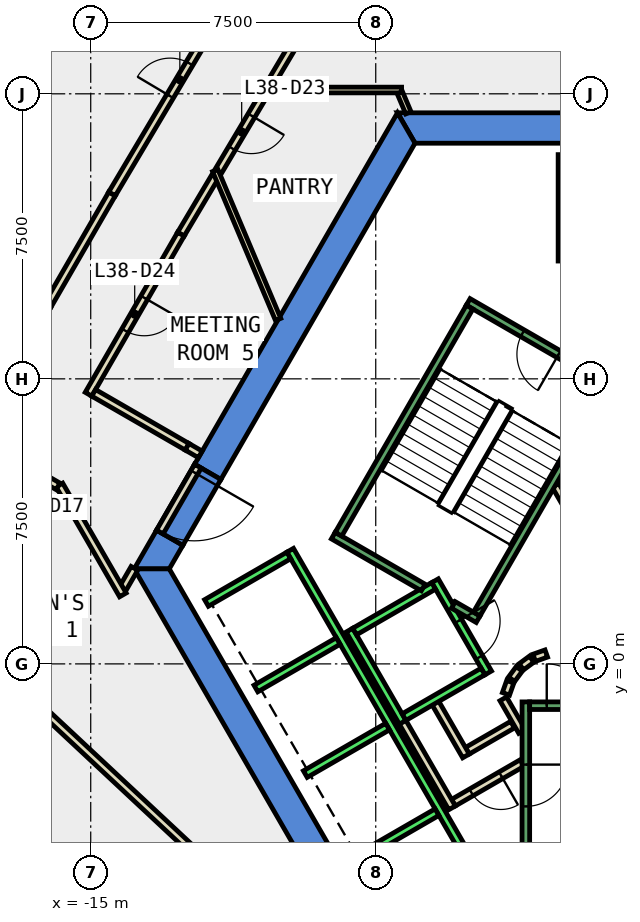
"""IFC4 building model, lengths in metres.
Left out: names, types, materials, properties, quantities, classifications, styles, units other than length and angle.
Written with IfcOpenShell. Run it as: python <this file> out.ifc"""

import sys

from ifc_helpers import new_model, si_unit, direction, frame, frame_2d, origin, place, context, subcontext, project, spatial, polyline, rectangle, outline, extrude, element, fill, save


model = new_model("IFC4")
c1 = context("Model", 3, precision=1e-05, world=origin(), true_north=direction((0.0, 1.0)))
c2 = subcontext(c1, "Body", "Model", "MODEL_VIEW")
j1 = project(units=[si_unit("LENGTHUNIT", "METRE"), si_unit("PLANEANGLEUNIT", "RADIAN")], contexts=[c1])
p1 = place(None, origin())
s1 = spatial("IfcSite", under=j1, at=p1, CompositionType="ELEMENT")
p2 = place(p1, origin())
s2 = spatial("IfcBuilding", under=s1, at=p2, CompositionType="ELEMENT")
p3 = place(p2, frame((0.0, 0.0, 171.8)))
s3 = spatial("IfcBuildingStorey", under=s2, at=p3, CompositionType="ELEMENT", Elevation=171.8)
p4 = place(p3, frame((0.0, 0.0, -0.4)))
e1 = element("IfcWall", 1, at=p4, inside=s3, PredefinedType="SHEAR", context=c2, shape_type="SweptSolid", body=[
    extrude(outline(polyline([(6.928, 14.5), (-6.928, 14.5), (-6.466, 13.7), (6.466, 13.7), (6.928, 14.5)])), origin(), (0.0, 0.0, 1.0), 4.2),
])
p5 = place(p3, frame((0.0, 0.0, -0.4)))
e2 = element("IfcWall", 2, at=p5, inside=s3, PredefinedType="SHEAR", context=c2, shape_type="SweptSolid", body=[
    extrude(outline(polyline([(-12.267, 5.252), (-11.575, 4.852), (-6.466, 13.7), (-6.928, 14.5), (-12.267, 5.252)])), origin(), (0.0, 0.0, 1.0), 4.2),
])
p6 = place(p3, frame((0.0, 0.0, -0.4)))
e3 = element("IfcWall", 3, at=p6, inside=s3, PredefinedType="SHEAR", context=c2, shape_type="SweptSolid", body=[
    extrude(outline(polyline([(-12.575, 3.12), (-13.267, 3.52), (-13.856, 2.5), (-12.933, 2.5), (-12.575, 3.12)])), origin(), (0.0, 0.0, 1.0), 4.2),
])
p7 = place(p3, frame((0.0, 0.0, 3.6)))
e4 = element("IfcWall", 4, at=p7, inside=s3, PredefinedType="SHEAR", context=c2, shape_type="SweptSolid", body=[
    extrude(outline(polyline([(-13.267, 3.52), (-12.575, 3.12), (-11.575, 4.852), (-12.267, 5.252), (-13.267, 3.52)])), origin(), (0.0, 0.0, 1.0), 0.2),
])
p8 = place(p3, frame((0.0, 0.0, -0.4)))
e5 = element("IfcWall", 5, at=p8, inside=s3, PredefinedType="SHEAR", context=c2, shape_type="SweptSolid", body=[
    extrude(outline(polyline([(-13.856, 2.5), (-6.928, -9.5), (-6.466, -8.7), (-12.933, 2.5), (-13.856, 2.5)])), origin(), (0.0, 0.0, 1.0), 4.2),
])
p9 = place(p3, frame((-10.41, 15.036, 0.0), z_axis=(0.0, 0.0, 1.0), x_axis=(-0.510900085603, -0.859640100583, 0.0)))
e6 = element("IfcWall", 6, at=p9, inside=s3, PredefinedType="PARTITIONING", context=c2, shape_type="SweptSolid", body=[
    extrude(rectangle(XDim=2.419, YDim=0.2, at=frame_2d((1.21, 0.0))), origin(), (0.0, 0.0, 1.0), 3.8),
])
p10 = place(p9, frame((0.709, 0.0, 0.0)))
e7 = element("IfcOpeningElement", 7, at=p10, cuts=e6, PredefinedType="OPENING", context=c2, shape_type="SweptSolid", body=[
    extrude(rectangle(XDim=1.0, YDim=2.1, at=frame_2d((0.5, 1.05))), frame((0.0, 0.11, 0.0), z_axis=(0.0, -1.0, 0.0), x_axis=(1.0, 0.0, 0.0)), (0.0, 0.0, 1.0), 0.22),
])
p11 = place(p3, frame((-11.723, 12.827, 0.0), z_axis=(0.0, 0.0, 1.0), x_axis=(-0.511182890129, -0.859471961637, 0.0)))
e8 = element("IfcWall", 8, at=p11, inside=s3, PredefinedType="PARTITIONING", context=c2, shape_type="SweptSolid", body=[
    extrude(rectangle(XDim=1.769, YDim=0.2, at=frame_2d((0.884, 0.0))), origin(), (0.0, 0.0, 1.0), 3.8),
])
p12 = place(p3, frame((-12.627, 11.307, 0.0), z_axis=(0.0, 0.0, 1.0), x_axis=(-0.499907870494, -0.866078588246, 0.0)))
e9 = element("IfcWall", 9, at=p12, inside=s3, PredefinedType="PARTITIONING", context=c2, shape_type="SweptSolid", body=[
    extrude(rectangle(XDim=4.863, YDim=0.2, at=frame_2d((2.432, 0.0))), origin(), (0.0, 0.0, 1.0), 3.8),
])
p13 = place(p12, frame((1.932, 0.0, 0.0)))
e10 = element("IfcOpeningElement", 10, at=p13, cuts=e9, PredefinedType="OPENING", context=c2, shape_type="SweptSolid", body=[
    extrude(rectangle(XDim=1.0, YDim=2.1, at=frame_2d((0.5, 1.05))), frame((0.0, 0.11, 0.0), z_axis=(0.0, -1.0, 0.0), x_axis=(1.0, 0.0, 0.0)), (0.0, 0.0, 1.0), 0.22),
])
p14 = place(p3, frame((-14.922, 7.131, 0.0), z_axis=(0.0, 0.0, 1.0), x_axis=(0.866124025492, -0.499829143273, 0.0)))
e11 = element("IfcWall", 11, at=p14, inside=s3, PredefinedType="PARTITIONING", context=c2, shape_type="SweptSolid", body=[
    extrude(rectangle(XDim=2.839, YDim=0.2, at=frame_2d((1.42, 0.0))), origin(), (0.0, 0.0, 1.0), 3.8),
])
p15 = place(p3, frame((-9.073, 17.285, 0.0), z_axis=(0.0, 0.0, 1.0), x_axis=(-0.51105761127, -0.859546460619, 0.0)))
e12 = element("IfcWall", 12, at=p15, inside=s3, PredefinedType="PARTITIONING", context=c2, shape_type="SweptSolid", body=[
    extrude(rectangle(XDim=2.467, YDim=0.2, at=frame_2d((1.234, 0.0))), origin(), (0.0, 0.0, 1.0), 3.8),
])
p16 = place(p3, frame((-13.85, 2.514, 0.0), z_axis=(0.0, 0.0, 1.0), x_axis=(-0.500418219013, -0.865783810244, 0.0)))
e13 = element("IfcWall", 13, at=p16, inside=s3, PredefinedType="PARTITIONING", context=c2, shape_type="SweptSolid", body=[
    extrude(rectangle(XDim=0.607, YDim=0.2, at=frame_2d((0.304, 0.0))), origin(), (0.0, 0.0, 1.0), 3.8),
])
p17 = place(p3, frame((-14.154, 1.815, 0.0), z_axis=(0.0, 0.0, 1.0), x_axis=(-0.500038857296, 0.866002968352, 0.0)))
e14 = element("IfcWall", 14, at=p17, inside=s3, PredefinedType="PARTITIONING", context=c2, shape_type="SweptSolid", body=[
    extrude(rectangle(XDim=3.34, YDim=0.2, at=frame_2d((1.67, 0.0))), origin(), (0.0, 0.0, 1.0), 3.8),
])
p18 = place(p3, frame((-15.86, 4.671, 0.0), z_axis=(0.0, 0.0, 1.0), x_axis=(-0.866047486323, 0.49996174997, 0.0)))
e15 = element("IfcWall", 15, at=p18, inside=s3, PredefinedType="PARTITIONING", context=c2, shape_type="SweptSolid", body=[
    extrude(rectangle(XDim=0.412, YDim=0.2, at=frame_2d((0.206, 0.0))), origin(), (0.0, 0.0, 1.0), 3.8),
])
p19 = place(p3, frame((-16.147, 9.41, 0.0), z_axis=(0.0, 0.0, 1.0), x_axis=(0.500044178772, 0.865999895656, 0.0)))
e16 = element("IfcWall", 16, at=p19, inside=s3, PredefinedType="PARTITIONING", context=c2, shape_type="SweptSolid", body=[
    extrude(rectangle(XDim=3.416, YDim=0.2, at=frame_2d((1.708, 0.0))), origin(), (0.0, 0.0, 1.0), 3.8),
])
p20 = place(p3, frame((-14.439, 12.368, 0.0), z_axis=(0.0, 0.0, 1.0), x_axis=(0.51096926939, 0.859598979606, 0.0)))
e17 = element("IfcWall", 17, at=p20, inside=s3, PredefinedType="PARTITIONING", context=c2, shape_type="SweptSolid", body=[
    extrude(rectangle(XDim=6.983, YDim=0.2, at=frame_2d((3.491, 0.0))), origin(), (0.0, 0.0, 1.0), 3.8),
])
p21 = place(p20, frame((2.991, 0.0, 0.0)))
e18 = element("IfcOpeningElement", 18, at=p21, cuts=e17, PredefinedType="OPENING", context=c2, shape_type="SweptSolid", body=[
    extrude(rectangle(XDim=1.0, YDim=2.1, at=frame_2d((0.5, 1.05))), frame((0.0, 0.11, 0.0), z_axis=(0.0, -1.0, 0.0), x_axis=(1.0, 0.0, 0.0)), (0.0, 0.0, 1.0), 0.22),
])
p22 = place(p3, frame((-2.6, 10.6, 0.0), z_axis=(0.0, 0.0, 1.0), x_axis=(0.0, 1.0, 0.0)))
e19 = element("IfcWall", 19, at=p22, inside=s3, PredefinedType="PARTITIONING", context=c2, shape_type="SweptSolid", body=[
    extrude(rectangle(XDim=2.8, YDim=0.2, at=frame_2d((1.4, 0.0))), origin(), (0.0, 0.0, 1.0), 3.8),
])
p23 = place(p3, frame((-3.9, -1.599, 0.0), z_axis=(0.0, 0.0, 1.0), x_axis=(-0.865969445389, -0.500096910261, 0.0)))
e20 = element("IfcWall", 20, at=p23, inside=s3, PredefinedType="PARTITIONING", context=c2, shape_type="SweptSolid", body=[
    extrude(rectangle(XDim=1.373, YDim=0.2, at=frame_2d((0.687, 0.0))), origin(), (0.0, 0.0, 1.0), 3.8),
])
p24 = place(p3, frame((-5.126, -2.422, 0.0), z_axis=(0.0, 0.0, 1.0), x_axis=(-0.500062241894, 0.865989465428, 0.0)))
e21 = element("IfcWall", 21, at=p24, inside=s3, PredefinedType="PARTITIONING", context=c2, shape_type="SweptSolid", body=[
    extrude(rectangle(XDim=1.7, YDim=0.2, at=frame_2d((0.85, 0.0))), origin(), (0.0, 0.0, 1.0), 3.8),
])
p25 = place(p3, frame((-3.65, -2.61, 0.0), z_axis=(0.0, 0.0, 1.0), x_axis=(-0.866072462134, -0.499918483688, 0.0)))
e22 = element("IfcWall", 22, at=p25, inside=s3, PredefinedType="PARTITIONING", context=c2, shape_type="SweptSolid", body=[
    extrude(rectangle(XDim=2.084, YDim=0.2, at=frame_2d((1.042, 0.0))), origin(), (0.0, 0.0, 1.0), 3.8),
])
p26 = place(p25, frame((0.642, 0.0, 0.0)))
e23 = element("IfcOpeningElement", 23, at=p26, cuts=e22, PredefinedType="OPENING", context=c2, shape_type="SweptSolid", body=[
    extrude(rectangle(XDim=0.9, YDim=2.1, at=frame_2d((0.45, 1.05))), frame((0.0, 0.11, 0.0), z_axis=(0.0, -1.0, 0.0), x_axis=(1.0, 0.0, 0.0)), (0.0, 0.0, 1.0), 0.22),
])
p27 = place(p3, frame((-5.492, -3.788, 0.0), z_axis=(0.0, 0.0, 1.0), x_axis=(-0.500008949224, 0.866020236886, 0.0)))
e24 = element("IfcWall", 24, at=p27, inside=s3, PredefinedType="PARTITIONING", context=c2, shape_type="SweptSolid", body=[
    extrude(rectangle(XDim=2.68, YDim=0.2, at=frame_2d((1.34, 0.0))), origin(), (0.0, 0.0, 1.0), 3.8),
])
p28 = place(p3, frame((-4.145, -0.92, 0.0), z_axis=(0.0, 0.0, 1.0), x_axis=(0.499743786207, -0.866173278362, 0.0)))
e25 = element("IfcWall", 25, at=p28, inside=s3, PredefinedType="PARTITIONING", context=c2, shape_type="SweptSolid", body=[
    extrude(rectangle(XDim=0.991, YDim=0.2, at=frame_2d((0.495, 0.0))), origin(), (0.0, 0.0, 1.0), 3.8),
])
p29 = place(p3, frame((-10.068, 9.062, 0.0), z_axis=(0.0, 0.0, 1.0), x_axis=(-0.388992587102, 0.921240884448, 0.0)))
e26 = element("IfcWall", 26, at=p29, inside=s3, PredefinedType="PARTITIONING", context=c2, shape_type="SweptSolid", body=[
    extrude(rectangle(XDim=4.257, YDim=0.15, at=frame_2d((2.128, 0.0))), origin(), (0.0, 0.0, 1.0), 3.8),
])
p30 = place(p3, frame((-6.82, 15.1, 0.0), z_axis=(0.0, 0.0, 1.0), x_axis=(-1.0, 0.0, 0.0)))
e27 = element("IfcWall", 27, at=p30, inside=s3, PredefinedType="PARTITIONING", context=c2, shape_type="SweptSolid", body=[
    extrude(rectangle(XDim=3.652, YDim=0.15, at=frame_2d((1.826, 0.0))), origin(), (0.0, 0.0, 1.0), 3.8),
])
p31 = place(p3, frame((-6.641, 14.5, 0.0), z_axis=(0.0, 0.0, 1.0), x_axis=(-0.389930013825, 0.920844495188, 0.0)))
e28 = element("IfcWall", 28, at=p31, inside=s3, PredefinedType="PARTITIONING", context=c2, shape_type="SweptSolid", body=[
    extrude(rectangle(XDim=0.577, YDim=0.15, at=frame_2d((0.288, 0.0))), origin(), (0.0, 0.0, 1.0), 3.8),
])
p32 = place(p3, frame((-2.771, 4.7, 0.0), z_axis=(0.0, 0.0, 1.0), x_axis=(0.499969479948, -0.866043023828, 0.0)))
e29 = element("IfcWall", 29, at=p32, inside=s3, PredefinedType="PARTITIONING", context=c2, shape_type="SweptSolid", body=[
    extrude(rectangle(XDim=4.99, YDim=0.2, at=frame_2d((2.495, 0.0))), origin(), (0.0, 0.0, 1.0), 3.8),
])
p33 = place(p32, frame((1.945, 0.0, 0.0)))
e30 = element("IfcOpeningElement", 30, at=p33, cuts=e29, PredefinedType="OPENING", context=c2, shape_type="SweptSolid", body=[
    extrude(rectangle(XDim=1.0, YDim=2.1, at=frame_2d((0.5, 1.05))), frame((0.0, 0.11, 0.0), z_axis=(0.0, -1.0, 0.0), x_axis=(1.0, 0.0, 0.0)), (0.0, 0.0, 1.0), 0.22),
])
p34 = place(p3, frame((-3.012, 0.273, 0.0), z_axis=(0.0, 0.0, 1.0), x_axis=(-0.942280615813, -0.334824194261, 0.0)))
e31 = element("IfcWall", 31, at=p34, inside=s3, PredefinedType="PARTITIONING", context=c2, shape_type="SweptSolid", body=[
    extrude(rectangle(XDim=0.338, YDim=0.2, at=frame_2d((0.169, 0.0))), origin(), (0.0, 0.0, 1.0), 3.8),
])
p35 = place(p3, frame((-3.397, 0.124, 0.0), z_axis=(0.0, 0.0, 1.0), x_axis=(-0.804311165252, -0.594208338422, 0.0)))
e32 = element("IfcWall", 32, at=p35, inside=s3, PredefinedType="PARTITIONING", context=c2, shape_type="SweptSolid", body=[
    extrude(rectangle(XDim=0.338, YDim=0.2, at=frame_2d((0.169, 0.0))), origin(), (0.0, 0.0, 1.0), 3.8),
])
p36 = place(p3, frame((-3.723, -0.131, 0.0), z_axis=(0.0, 0.0, 1.0), x_axis=(-0.594675113454, -0.803966112121, 0.0)))
e33 = element("IfcWall", 33, at=p36, inside=s3, PredefinedType="PARTITIONING", context=c2, shape_type="SweptSolid", body=[
    extrude(rectangle(XDim=0.338, YDim=0.2, at=frame_2d((0.169, 0.0))), origin(), (0.0, 0.0, 1.0), 3.8),
])
p37 = place(p3, frame((-3.96, -0.47, 0.0), z_axis=(0.0, 0.0, 1.0), x_axis=(-0.334824194261, -0.942280615813, 0.0)))
e34 = element("IfcWall", 34, at=p37, inside=s3, PredefinedType="PARTITIONING", context=c2, shape_type="SweptSolid", body=[
    extrude(rectangle(XDim=0.338, YDim=0.2, at=frame_2d((0.169, 0.0))), origin(), (0.0, 0.0, 1.0), 3.8),
])
p38 = place(p3, frame((-11.372, -5.79, 0.0), z_axis=(0.0, 0.0, 1.0), x_axis=(-0.730922728623, 0.682460229451, 0.0)))
e35 = element("IfcWall", 35, at=p38, inside=s3, PredefinedType="PARTITIONING", context=c2, shape_type="SweptSolid", body=[
    extrude(rectangle(XDim=9.924, YDim=0.2, at=frame_2d((4.962, 0.0))), origin(), (0.0, 0.0, 1.0), 3.8),
])
p39 = place(p3, frame((-12.18, 5.202, 0.0), z_axis=(0.0, 0.0, 1.0), x_axis=(-0.50002537861, -0.866010750942, 0.0)))
e36 = element("IfcWall", 36, at=p39, inside=s3, PredefinedType="PARTITIONING", context=c2, shape_type="SweptSolid", body=[
    extrude(rectangle(XDim=2.0, YDim=0.2, at=frame_2d((1.0, 0.0))), origin(), (0.0, 0.0, 1.0), 2.4),
])
p40 = place(p39, frame((0.19, 0.0, 0.0)))
e37 = element("IfcOpeningElement", 37, at=p40, cuts=e36, PredefinedType="OPENING", context=c2, shape_type="SweptSolid", body=[
    extrude(rectangle(XDim=1.8, YDim=2.1, at=frame_2d((0.9, 1.05))), frame((0.0, 0.11, 0.0), z_axis=(0.0, -1.0, 0.0), x_axis=(1.0, 0.0, 0.0)), (0.0, 0.0, 1.0), 0.22),
])
p41 = place(p3, frame((-12.463, 5.712, 0.0), z_axis=(0.0, 0.0, 1.0), x_axis=(0.865788603161, -0.500409926597, 0.0)))
e38 = element("IfcWall", 38, at=p41, inside=s3, PredefinedType="PARTITIONING", context=c2, shape_type="SweptSolid", body=[
    extrude(rectangle(XDim=0.4, YDim=0.2, at=frame_2d((0.2, 0.0))), origin(), (0.0, 0.0, 1.0), 2.4),
])
p42 = place(p3, frame((-5.94, 2.188, 0.0), z_axis=(0.0, 0.0, 1.0), x_axis=(0.49994636267, -0.866056369097, 0.0)))
e39 = element("IfcWall", 39, at=p42, inside=s3, PredefinedType="STANDARD", context=c2, shape_type="SweptSolid", body=[
    extrude(rectangle(XDim=2.8, YDim=0.2, at=frame_2d((1.4, 0.0))), origin(), (0.0, 0.0, 1.0), 3.8),
])
p43 = place(p42, frame((1.225, 0.0, 0.0)))
e40 = element("IfcOpeningElement", 40, at=p43, cuts=e39, PredefinedType="OPENING", context=c2, shape_type="SweptSolid", body=[
    extrude(rectangle(XDim=1.1, YDim=2.1, at=frame_2d((0.55, 1.05))), frame((0.0, 0.11, 0.0), z_axis=(0.0, -1.0, 0.0), x_axis=(1.0, 0.0, 0.0)), (0.0, 0.0, 1.0), 0.22),
])
p44 = place(p3, frame((-8.192, 0.888, 0.0), z_axis=(0.0, 0.0, 1.0), x_axis=(0.49994636267, -0.866056369097, 0.0)))
e41 = element("IfcWall", 41, at=p44, inside=s3, PredefinedType="STANDARD", context=c2, shape_type="SweptSolid", body=[
    extrude(rectangle(XDim=2.8, YDim=0.2, at=frame_2d((1.4, 0.0))), origin(), (0.0, 0.0, 1.0), 3.8),
])
for number, where, z_axis, x_axis in (
    (42, (-5.977, 2.052, 0.0), (0.0, 0.0, 1.0), (-0.866, -0.5, 0.0)),
    (43, (-4.677, -0.2, 0.0), (0.0, 0.0, 1.0), (-0.866, -0.5, 0.0)),
):
    element("IfcWall", number, at=place(p3, frame(where, z_axis=z_axis, x_axis=x_axis)), inside=s3, PredefinedType="STANDARD", context=c2, shape_type="SweptSolid", body=[
        extrude(rectangle(XDim=2.399, YDim=0.2, at=frame_2d((1.2, 0.0))), origin(), (0.0, 0.0, 1.0), 3.8),
    ])
p45 = place(p3, frame((-9.751, 2.99, 0.0), z_axis=(0.0, 0.0, 1.0), x_axis=(0.50000090737, -0.866024879913, 0.0)))
e44 = element("IfcWall", 44, at=p45, inside=s3, PredefinedType="STANDARD", context=c2, shape_type="SweptSolid", body=[
    extrude(rectangle(XDim=10.6, YDim=0.2, at=frame_2d((5.3, 0.0))), origin(), (0.0, 0.0, 1.0), 3.8),
])
p46 = place(p3, frame((-9.788, 2.853, 0.0), z_axis=(0.0, 0.0, 1.0), x_axis=(-0.865998541277, -0.500046524342, 0.0)))
e45 = element("IfcWall", 45, at=p46, inside=s3, PredefinedType="STANDARD", context=c2, shape_type="SweptSolid", body=[
    extrude(rectangle(XDim=2.5, YDim=0.2, at=frame_2d((1.25, 0.0))), origin(), (0.0, 0.0, 1.0), 3.8),
])
for number, where, z_axis, x_axis in (
    (46, (-8.488, 0.602, 0.0), (0.0, 0.0, 1.0), (-0.866, -0.5, 0.0)),
    (47, (-7.188, -1.65, 0.0), (0.0, 0.0, 1.0), (-0.866, -0.5, 0.0)),
    (48, (-5.888, -3.902, 0.0), (0.0, 0.0, 1.0), (-0.866, -0.5, 0.0)),
):
    element("IfcWall", number, at=place(p3, frame(where, z_axis=z_axis, x_axis=x_axis)), inside=s3, PredefinedType="STANDARD", context=c2, shape_type="SweptSolid", body=[
        extrude(rectangle(XDim=2.5, YDim=0.2, at=frame_2d((1.25, 0.0))), origin(), (0.0, 0.0, 1.0), 3.8),
    ])
p47 = place(p3, frame((-3.55, -1.0, 0.0), z_axis=(0.0, 0.0, 1.0), x_axis=(0.0, -1.0, 0.0)))
e49 = element("IfcWall", 49, at=p47, inside=s3, PredefinedType="STANDARD", context=c2, shape_type="SweptSolid", body=[
    extrude(rectangle(XDim=4.4, YDim=0.2, at=frame_2d((2.2, 0.0))), origin(), (0.0, 0.0, 1.0), 3.8),
])
p48 = place(p47, frame((1.65, 0.0, 0.0)))
e50 = element("IfcOpeningElement", 50, at=p48, cuts=e49, PredefinedType="OPENING", context=c2, shape_type="SweptSolid", body=[
    extrude(rectangle(XDim=1.1, YDim=2.2, at=frame_2d((0.55, 1.1))), frame((0.0, 0.11, 0.0), z_axis=(0.0, -1.0, 0.0), x_axis=(1.0, 0.0, 0.0)), (0.0, 0.0, 1.0), 0.22),
])
p49 = place(p3, frame((-3.45, -1.1, 0.0), z_axis=(0.0, 0.0, 1.0), x_axis=(1.0, 0.0, 0.0)))
e51 = element("IfcWall", 51, at=p49, inside=s3, PredefinedType="STANDARD", context=c2, shape_type="SweptSolid", body=[
    extrude(rectangle(XDim=6.9, YDim=0.2, at=frame_2d((3.45, 0.0))), origin(), (0.0, 0.0, 1.0), 3.8),
])
p50 = place(p49, frame((0.45, 0.0, 0.0)))
e52 = element("IfcOpeningElement", 52, at=p50, cuts=e51, PredefinedType="OPENING", context=c2, shape_type="SweptSolid", body=[
    extrude(rectangle(XDim=1.1, YDim=2.2, at=frame_2d((0.55, 1.1))), frame((0.0, 0.11, 0.0), z_axis=(0.0, -1.0, 0.0), x_axis=(1.0, 0.0, 0.0)), (0.0, 0.0, 1.0), 0.22),
])
p51 = place(p3, frame((-1.256, 7.324, 0.0), z_axis=(0.0, 0.0, 1.0), x_axis=(-0.866046073146, 0.499964197906, 0.0)))
e53 = element("IfcWall", 53, at=p51, inside=s3, PredefinedType="STANDARD", context=c2, shape_type="SweptSolid", body=[
    extrude(rectangle(XDim=4.4, YDim=0.2, at=frame_2d((2.2, 0.0))), origin(), (0.0, 0.0, 1.0), 3.8),
])
p52 = place(p51, frame((1.65, 0.0, 0.0)))
e54 = element("IfcOpeningElement", 54, at=p52, cuts=e53, PredefinedType="OPENING", context=c2, shape_type="SweptSolid", body=[
    extrude(rectangle(XDim=1.1, YDim=2.2, at=frame_2d((0.55, 1.1))), frame((0.0, 0.11, 0.0), z_axis=(0.0, -1.0, 0.0), x_axis=(1.0, 0.0, 0.0)), (0.0, 0.0, 1.0), 0.22),
])
p53 = place(p3, frame((-6.25, 2.01, 0.0), z_axis=(0.0, 0.0, 1.0), x_axis=(-0.86611865017, 0.499838457731, 0.0)))
e55 = element("IfcWall", 55, at=p53, inside=s3, PredefinedType="STANDARD", context=c2, shape_type="SweptSolid", body=[
    extrude(rectangle(XDim=2.733, YDim=0.2, at=frame_2d((1.366, 0.0))), origin(), (0.0, 0.0, 1.0), 3.8),
])
p54 = place(p3, frame((-4.806, 1.176, 0.0), z_axis=(0.0, 0.0, 1.0), x_axis=(-0.866558586415, 0.499075361355, 0.0)))
e56 = element("IfcWall", 56, at=p54, inside=s3, PredefinedType="STANDARD", context=c2, shape_type="SweptSolid", body=[
    extrude(rectangle(XDim=0.751, YDim=0.2, at=frame_2d((0.376, 0.0))), origin(), (0.0, 0.0, 1.0), 3.8),
])
p55 = place(p3, frame((-1.393, 7.288, 0.0), z_axis=(0.0, 0.0, 1.0), x_axis=(-0.499963383562, -0.866046543262, 0.0)))
e57 = element("IfcWall", 57, at=p55, inside=s3, PredefinedType="STANDARD", context=c2, shape_type="SweptSolid", body=[
    extrude(rectangle(XDim=6.9, YDim=0.2, at=frame_2d((3.45, 0.0))), origin(), (0.0, 0.0, 1.0), 3.8),
])
p56 = place(p55, frame((0.45, 0.0, 0.0)))
e58 = element("IfcOpeningElement", 58, at=p56, cuts=e57, PredefinedType="OPENING", context=c2, shape_type="SweptSolid", body=[
    extrude(rectangle(XDim=1.1, YDim=2.2, at=frame_2d((0.55, 1.1))), frame((0.0, 0.11, 0.0), z_axis=(0.0, -1.0, 0.0), x_axis=(1.0, 0.0, 0.0)), (0.0, 0.0, 1.0), 0.22),
])
p57 = place(p3, frame((-5.03, 9.388, 0.0), z_axis=(0.0, 0.0, 1.0), x_axis=(-0.499978703459, -0.866037698999, 0.0)))
e59 = element("IfcWall", 59, at=p57, inside=s3, PredefinedType="STANDARD", context=c2, shape_type="SweptSolid", body=[
    extrude(rectangle(XDim=6.9, YDim=0.2, at=frame_2d((3.45, 0.0))), origin(), (0.0, 0.0, 1.0), 3.8),
])
p58 = place(p21, origin())
e60 = element("IfcDoor", 60, at=p58, inside=s3, OperationType="SINGLE_SWING_LEFT", PredefinedType="DOOR", context=c2, shape_type="SweptSolid", body=[
    extrude(rectangle(XDim=1.0, YDim=2.1, at=frame_2d((0.5, 1.05))), frame((0.0, 0.025, 0.0), z_axis=(0.0, -1.0, 0.0), x_axis=(1.0, 0.0, 0.0)), (0.0, 0.0, 1.0), 0.05),
])
fill(e18, e60)
p59 = place(p10, origin())
e61 = element("IfcDoor", 61, at=p59, inside=s3, OperationType="SINGLE_SWING_LEFT", PredefinedType="DOOR", context=c2, shape_type="SweptSolid", body=[
    extrude(rectangle(XDim=1.0, YDim=2.1, at=frame_2d((0.5, 1.05))), frame((0.0, 0.025, 0.0), z_axis=(0.0, -1.0, 0.0), x_axis=(1.0, 0.0, 0.0)), (0.0, 0.0, 1.0), 0.05),
])
fill(e7, e61)
p60 = place(p13, origin())
e62 = element("IfcDoor", 62, at=p60, inside=s3, OperationType="SINGLE_SWING_LEFT", PredefinedType="DOOR", context=c2, shape_type="SweptSolid", body=[
    extrude(rectangle(XDim=1.0, YDim=2.1, at=frame_2d((0.5, 1.05))), frame((0.0, 0.025, 0.0), z_axis=(0.0, -1.0, 0.0), x_axis=(1.0, 0.0, 0.0)), (0.0, 0.0, 1.0), 0.05),
])
fill(e10, e62)
p61 = place(p26, origin())
e63 = element("IfcDoor", 63, at=p61, inside=s3, OperationType="SINGLE_SWING_LEFT", PredefinedType="DOOR", context=c2, shape_type="SweptSolid", body=[
    extrude(rectangle(XDim=0.9, YDim=2.1, at=frame_2d((0.45, 1.05))), frame((0.0, 0.025, 0.0), z_axis=(0.0, -1.0, 0.0), x_axis=(1.0, 0.0, 0.0)), (0.0, 0.0, 1.0), 0.05),
])
fill(e23, e63)
p62 = place(p40, origin())
e64 = element("IfcDoor", 64, at=p62, inside=s3, OperationType="DOUBLE_DOOR_SINGLE_SWING", PredefinedType="DOOR", context=c2, shape_type="SweptSolid", body=[
    extrude(rectangle(XDim=1.8, YDim=2.1, at=frame_2d((0.9, 1.05))), frame((0.0, 0.025, 0.0), z_axis=(0.0, -1.0, 0.0), x_axis=(1.0, 0.0, 0.0)), (0.0, 0.0, 1.0), 0.05),
])
fill(e37, e64)
p63 = place(p43, origin())
e65 = element("IfcDoor", 65, at=p63, inside=s3, OperationType="SLIDING_TO_LEFT", PredefinedType="DOOR", context=c2, shape_type="SweptSolid", body=[
    extrude(rectangle(XDim=1.1, YDim=2.1, at=frame_2d((0.55, 1.05))), frame((0.0, 0.025, 0.0), z_axis=(0.0, -1.0, 0.0), x_axis=(1.0, 0.0, 0.0)), (0.0, 0.0, 1.0), 0.05),
])
fill(e40, e65)
p64 = place(p50, origin())
e66 = element("IfcDoor", 66, at=p64, inside=s3, OperationType="SINGLE_SWING_LEFT", PredefinedType="DOOR", context=c2, shape_type="SweptSolid", body=[
    extrude(rectangle(XDim=1.1, YDim=2.2, at=frame_2d((0.55, 1.1))), frame((0.0, 0.025, 0.0), z_axis=(0.0, -1.0, 0.0), x_axis=(1.0, 0.0, 0.0)), (0.0, 0.0, 1.0), 0.05),
])
fill(e52, e66)
p65 = place(p48, origin())
e67 = element("IfcDoor", 67, at=p65, inside=s3, OperationType="SINGLE_SWING_LEFT", PredefinedType="DOOR", context=c2, shape_type="SweptSolid", body=[
    extrude(rectangle(XDim=1.1, YDim=2.2, at=frame_2d((0.55, 1.1))), frame((0.0, 0.025, 0.0), z_axis=(0.0, -1.0, 0.0), x_axis=(1.0, 0.0, 0.0)), (0.0, 0.0, 1.0), 0.05),
])
fill(e50, e67)
p66 = place(p52, origin())
e68 = element("IfcDoor", 68, at=p66, inside=s3, OperationType="SINGLE_SWING_LEFT", PredefinedType="DOOR", context=c2, shape_type="SweptSolid", body=[
    extrude(rectangle(XDim=1.1, YDim=2.2, at=frame_2d((0.55, 1.1))), frame((0.0, 0.025, 0.0), z_axis=(0.0, -1.0, 0.0), x_axis=(1.0, 0.0, 0.0)), (0.0, 0.0, 1.0), 0.05),
])
fill(e54, e68)
save(model, sys.argv[1])
